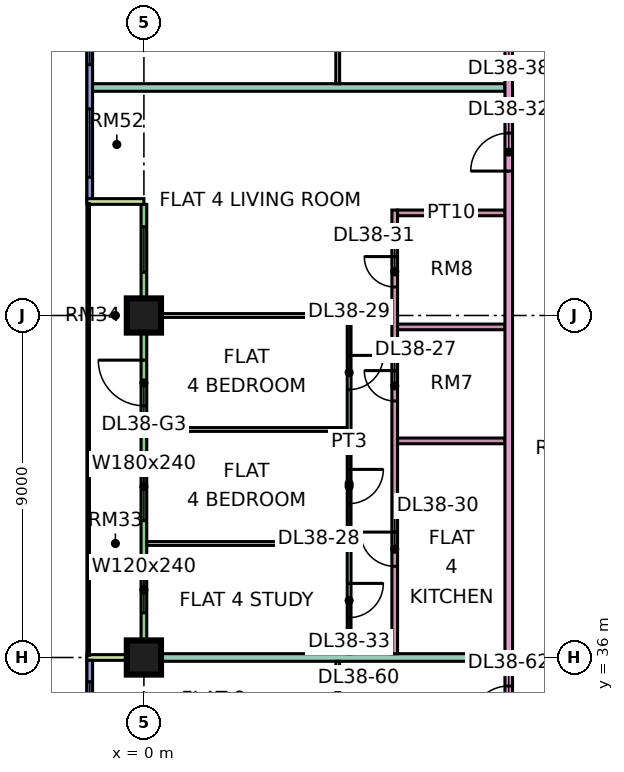
"""IFC4 building model, lengths in metres.
Left out: names, types, materials, properties, quantities, classifications, styles, units other than length and angle.
Written with IfcOpenShell. Run it as: python <this file> out.ifc"""

import sys

from ifc_helpers import new_model, si_unit, direction, frame, frame_2d, origin, origin_2d, place, context, subcontext, project, spatial, rectangle, extrude, element, fill, save


model = new_model("IFC4")
c1 = context("Model", 3, precision=1e-05, world=origin(), true_north=direction((0.0, 1.0)))
c2 = subcontext(c1, "Body", "Model", "MODEL_VIEW")
j1 = project(units=[si_unit("LENGTHUNIT", "METRE"), si_unit("PLANEANGLEUNIT", "RADIAN")], contexts=[c1])
p1 = place(None, origin())
s1 = spatial("IfcSite", under=j1, at=p1, CompositionType="ELEMENT")
p2 = place(p1, origin())
s2 = spatial("IfcBuilding", under=s1, at=p2, CompositionType="ELEMENT")
p3 = place(p2, frame((0.0, 0.0, 168.65)))
s3 = spatial("IfcBuildingStorey", under=s2, at=p3, CompositionType="ELEMENT", Elevation=168.65)
p4 = place(p3, frame((0.0, 36.0, 0.0), z_axis=(0.0, 0.0, 1.0), x_axis=(1.0, 0.0, 0.0)))
e1 = element("IfcColumn", 1, at=p4, inside=s3, PredefinedType="COLUMN", context=c2, shape_type="SweptSolid", body=[
    extrude(rectangle(XDim=0.9, YDim=0.9, at=origin_2d()), origin(), (0.0, 0.0, 1.0), 3.75),
])
p5 = place(p3, frame((0.0, 45.0, 0.0), z_axis=(0.0, 0.0, 1.0), x_axis=(1.0, 0.0, 0.0)))
e2 = element("IfcColumn", 2, at=p5, inside=s3, PredefinedType="COLUMN", context=c2, shape_type="SweptSolid", body=[
    extrude(rectangle(XDim=0.9, YDim=0.9, at=origin_2d()), origin(), (0.0, 0.0, 1.0), 3.75),
])
p6 = place(p3, frame((-1.425, 61.5, 0.0), z_axis=(0.0, 0.0, 1.0), x_axis=(0.0, -1.0, 0.0)))
e3 = element("IfcWall", 3, at=p6, inside=s3, PredefinedType="SOLIDWALL", context=c2, shape_type="SweptSolid", body=[
    extrude(rectangle(XDim=13.425, YDim=0.15, at=frame_2d((6.712, 0.0))), origin(), (0.0, 0.0, 1.0), 3.35),
])
p7 = place(p6, frame((0.45, 0.0, 0.45)))
e4 = element("IfcOpeningElement", 4, at=p7, cuts=e3, PredefinedType="OPENING", context=c2, shape_type="SweptSolid", body=[
    extrude(rectangle(XDim=3.6, YDim=2.4, at=frame_2d((1.8, 1.2))), frame((0.0, 0.085, 0.0), z_axis=(0.0, -1.0, 0.0), x_axis=(1.0, 0.0, 0.0)), (0.0, 0.0, 1.0), 0.17),
])
p8 = place(p6, frame((5.1, 0.0, 0.45)))
e5 = element("IfcOpeningElement", 5, at=p8, cuts=e3, PredefinedType="OPENING", context=c2, shape_type="SweptSolid", body=[
    extrude(rectangle(XDim=1.8, YDim=2.4, at=frame_2d((0.9, 1.2))), frame((0.0, 0.085, 0.0), z_axis=(0.0, -1.0, 0.0), x_axis=(1.0, 0.0, 0.0)), (0.0, 0.0, 1.0), 0.17),
])
p9 = place(p6, frame((8.1, 0.0, 0.45)))
e6 = element("IfcOpeningElement", 6, at=p9, cuts=e3, PredefinedType="OPENING", context=c2, shape_type="SweptSolid", body=[
    extrude(rectangle(XDim=1.8, YDim=2.4, at=frame_2d((0.9, 1.2))), frame((0.0, 0.085, 0.0), z_axis=(0.0, -1.0, 0.0), x_axis=(1.0, 0.0, 0.0)), (0.0, 0.0, 1.0), 0.17),
])
p10 = place(p6, frame((11.062, 0.0, 0.45)))
e7 = element("IfcOpeningElement", 7, at=p10, cuts=e3, PredefinedType="OPENING", context=c2, shape_type="SweptSolid", body=[
    extrude(rectangle(XDim=1.8, YDim=2.4, at=frame_2d((0.9, 1.2))), frame((0.0, 0.085, 0.0), z_axis=(0.0, -1.0, 0.0), x_axis=(1.0, 0.0, 0.0)), (0.0, 0.0, 1.0), 0.17),
])
p11 = place(p3, frame((0.0, 47.925, 0.0), z_axis=(0.0, 0.0, 1.0), x_axis=(0.0, -1.0, 0.0)))
e8 = element("IfcWall", 8, at=p11, inside=s3, PredefinedType="SOLIDWALL", context=c2, shape_type="SweptSolid", body=[
    extrude(rectangle(XDim=11.85, YDim=0.15, at=frame_2d((5.925, 0.0))), origin(), (0.0, 0.0, 1.0), 3.35),
])
p12 = place(p11, frame((0.587, 0.0, 0.45)))
e9 = element("IfcOpeningElement", 9, at=p12, cuts=e8, PredefinedType="OPENING", context=c2, shape_type="SweptSolid", body=[
    extrude(rectangle(XDim=1.2, YDim=2.4, at=frame_2d((0.6, 1.2))), frame((0.0, 0.085, 0.0), z_axis=(0.0, -1.0, 0.0), x_axis=(1.0, 0.0, 0.0)), (0.0, 0.0, 1.0), 0.17),
])
p13 = place(p11, frame((4.1, 0.0, 0.0)))
e10 = element("IfcOpeningElement", 10, at=p13, cuts=e8, PredefinedType="OPENING", context=c2, shape_type="SweptSolid", body=[
    extrude(rectangle(XDim=1.2, YDim=2.4, at=frame_2d((0.6, 1.2))), frame((0.0, 0.085, 0.0), z_axis=(0.0, -1.0, 0.0), x_axis=(1.0, 0.0, 0.0)), (0.0, 0.0, 1.0), 0.17),
])
p14 = place(p11, frame((6.525, 0.0, 0.45)))
e11 = element("IfcOpeningElement", 11, at=p14, cuts=e8, PredefinedType="OPENING", context=c2, shape_type="SweptSolid", body=[
    extrude(rectangle(XDim=1.8, YDim=2.4, at=frame_2d((0.9, 1.2))), frame((0.0, 0.085, 0.0), z_axis=(0.0, -1.0, 0.0), x_axis=(1.0, 0.0, 0.0)), (0.0, 0.0, 1.0), 0.17),
])
p15 = place(p11, frame((9.55, 0.0, 0.45)))
e12 = element("IfcOpeningElement", 12, at=p15, cuts=e8, PredefinedType="OPENING", context=c2, shape_type="SweptSolid", body=[
    extrude(rectangle(XDim=1.2, YDim=2.4, at=frame_2d((0.6, 1.2))), frame((0.0, 0.085, 0.0), z_axis=(0.0, -1.0, 0.0), x_axis=(1.0, 0.0, 0.0)), (0.0, 0.0, 1.0), 0.17),
])
for number, where, z_axis, x_axis in (
    (13, (-1.5, 48.0, 0.0), (0.0, 0.0, 1.0), (1.0, 0.0, 0.0)),
    (14, (-1.5, 36.0, 0.0), (0.0, 0.0, 1.0), (1.0, 0.0, 0.0)),
):
    element("IfcWall", number, at=place(p3, frame(where, z_axis=z_axis, x_axis=x_axis)), inside=s3, PredefinedType="SOLIDWALL", context=c2, shape_type="SweptSolid", body=[
        extrude(rectangle(XDim=1.5, YDim=0.15, at=frame_2d((0.75, 0.0))), origin(), (0.0, 0.0, 1.0), 3.35),
    ])
p16 = place(p3, frame((-1.425, 35.925, 0.0), z_axis=(0.0, 0.0, 1.0), x_axis=(0.0, -1.0, 0.0)))
e15 = element("IfcWall", 15, at=p16, inside=s3, PredefinedType="SOLIDWALL", context=c2, shape_type="SweptSolid", body=[
    extrude(rectangle(XDim=11.85, YDim=0.15, at=frame_2d((5.925, 0.0))), origin(), (0.0, 0.0, 1.0), 3.35),
])
p17 = place(p16, frame((0.562, 0.0, 0.45)))
e16 = element("IfcOpeningElement", 16, at=p17, cuts=e15, PredefinedType="OPENING", context=c2, shape_type="SweptSolid", body=[
    extrude(rectangle(XDim=1.8, YDim=2.4, at=frame_2d((0.9, 1.2))), frame((0.0, 0.085, 0.0), z_axis=(0.0, -1.0, 0.0), x_axis=(1.0, 0.0, 0.0)), (0.0, 0.0, 1.0), 0.17),
])
p18 = place(p16, frame((3.525, 0.0, 0.45)))
e17 = element("IfcOpeningElement", 17, at=p18, cuts=e15, PredefinedType="OPENING", context=c2, shape_type="SweptSolid", body=[
    extrude(rectangle(XDim=1.8, YDim=2.4, at=frame_2d((0.9, 1.2))), frame((0.0, 0.085, 0.0), z_axis=(0.0, -1.0, 0.0), x_axis=(1.0, 0.0, 0.0)), (0.0, 0.0, 1.0), 0.17),
])
p19 = place(p16, frame((7.387, 0.0, 0.45)))
e18 = element("IfcOpeningElement", 18, at=p19, cuts=e15, PredefinedType="OPENING", context=c2, shape_type="SweptSolid", body=[
    extrude(rectangle(XDim=3.0, YDim=2.4, at=frame_2d((1.5, 1.2))), frame((0.0, 0.085, 0.0), z_axis=(0.0, -1.0, 0.0), x_axis=(1.0, 0.0, 0.0)), (0.0, 0.0, 1.0), 0.17),
])
e19 = element("IfcWall", 19, at=p4, inside=s3, PredefinedType="PARTITIONING", context=c2, shape_type="SweptSolid", body=[
    extrude(rectangle(XDim=9.5, YDim=0.2, at=frame_2d((4.75, 0.0))), origin(), (0.0, 0.0, 1.0), 3.35),
])
p20 = place(p3, frame((-1.35, 51.0, 0.0), z_axis=(0.0, 0.0, 1.0), x_axis=(1.0, 0.0, 0.0)))
e20 = element("IfcWall", 20, at=p20, inside=s3, PredefinedType="PARTITIONING", context=c2, shape_type="SweptSolid", body=[
    extrude(rectangle(XDim=10.85, YDim=0.2, at=frame_2d((5.425, 0.0))), origin(), (0.0, 0.0, 1.0), 3.35),
])
for number, where, z_axis, x_axis in (
    (21, (0.074, 39.0, 0.0), (0.0, 0.0, 1.0), (1.0, 0.0, 0.0)),
    (22, (0.074, 42.0, 0.0), (0.0, 0.0, 1.0), (1.0, 0.0, 0.0)),
    (23, (0.074, 45.0, 0.0), (0.0, 0.0, 1.0), (1.0, 0.0, 0.0)),
):
    element("IfcWall", number, at=place(p3, frame(where, z_axis=z_axis, x_axis=x_axis)), inside=s3, PredefinedType="PARTITIONING", context=c2, shape_type="SweptSolid", body=[
        extrude(rectangle(XDim=5.276, YDim=0.1, at=frame_2d((2.638, 0.0))), origin(), (0.0, 0.0, 1.0), 3.35),
    ])
p21 = place(p3, frame((5.1, 29.95, 0.0), z_axis=(0.0, 0.0, 1.0), x_axis=(0.0, 1.0, 0.0)))
e24 = element("IfcWall", 24, at=p21, inside=s3, PredefinedType="PARTITIONING", context=c2, shape_type="SweptSolid", body=[
    extrude(rectangle(XDim=5.95, YDim=0.1, at=frame_2d((2.975, 0.0))), origin(), (0.0, 0.0, 1.0), 3.35),
])
p22 = place(p21, frame((1.1, 0.0, 0.0)))
e25 = element("IfcOpeningElement", 25, at=p22, cuts=e24, PredefinedType="OPENING", context=c2, shape_type="SweptSolid", body=[
    extrude(rectangle(XDim=0.9, YDim=2.1, at=frame_2d((0.45, 1.05))), frame((0.0, 0.06, 0.0), z_axis=(0.0, -1.0, 0.0), x_axis=(1.0, 0.0, 0.0)), (0.0, 0.0, 1.0), 0.12),
])
p23 = place(p21, frame((4.1, 0.0, 0.0)))
e26 = element("IfcOpeningElement", 26, at=p23, cuts=e24, PredefinedType="OPENING", context=c2, shape_type="SweptSolid", body=[
    extrude(rectangle(XDim=0.9, YDim=2.1, at=frame_2d((0.45, 1.05))), frame((0.0, 0.06, 0.0), z_axis=(0.0, -1.0, 0.0), x_axis=(1.0, 0.0, 0.0)), (0.0, 0.0, 1.0), 0.12),
])
p24 = place(p3, frame((5.1, 51.1, 0.0), z_axis=(0.0, 0.0, 1.0), x_axis=(0.0, 1.0, 0.0)))
e27 = element("IfcWall", 27, at=p24, inside=s3, PredefinedType="PARTITIONING", context=c2, shape_type="SweptSolid", body=[
    extrude(rectangle(XDim=5.95, YDim=0.1, at=frame_2d((2.975, 0.0))), origin(), (0.0, 0.0, 1.0), 3.35),
])
p25 = place(p24, frame((0.95, 0.0, 0.0)))
e28 = element("IfcOpeningElement", 28, at=p25, cuts=e27, PredefinedType="OPENING", context=c2, shape_type="SweptSolid", body=[
    extrude(rectangle(XDim=0.9, YDim=2.1, at=frame_2d((0.45, 1.05))), frame((0.0, 0.06, 0.0), z_axis=(0.0, -1.0, 0.0), x_axis=(1.0, 0.0, 0.0)), (0.0, 0.0, 1.0), 0.12),
])
p26 = place(p24, frame((3.95, 0.0, 0.0)))
e29 = element("IfcOpeningElement", 29, at=p26, cuts=e27, PredefinedType="OPENING", context=c2, shape_type="SweptSolid", body=[
    extrude(rectangle(XDim=0.9, YDim=2.1, at=frame_2d((0.45, 1.05))), frame((0.0, 0.06, 0.0), z_axis=(0.0, -1.0, 0.0), x_axis=(1.0, 0.0, 0.0)), (0.0, 0.0, 1.0), 0.12),
])
p27 = place(p3, frame((5.4, 36.1, 0.0), z_axis=(0.0, 0.0, 1.0), x_axis=(0.0, 1.0, 0.0)))
e30 = element("IfcWall", 30, at=p27, inside=s3, PredefinedType="PARTITIONING", context=c2, shape_type="SweptSolid", body=[
    extrude(rectangle(XDim=8.95, YDim=0.1, at=frame_2d((4.475, 0.0))), origin(), (0.0, 0.0, 1.0), 3.35),
])
p28 = place(p27, frame((3.95, 0.0, 0.0)))
e31 = element("IfcOpeningElement", 31, at=p28, cuts=e30, PredefinedType="OPENING", context=c2, shape_type="SweptSolid", body=[
    extrude(rectangle(XDim=0.9, YDim=2.1, at=frame_2d((0.45, 1.05))), frame((0.0, 0.06, 0.0), z_axis=(0.0, -1.0, 0.0), x_axis=(1.0, 0.0, 0.0)), (0.0, 0.0, 1.0), 0.12),
])
p29 = place(p27, frame((6.95, 0.0, 0.0)))
e32 = element("IfcOpeningElement", 32, at=p29, cuts=e30, PredefinedType="OPENING", context=c2, shape_type="SweptSolid", body=[
    extrude(rectangle(XDim=0.9, YDim=2.1, at=frame_2d((0.45, 1.05))), frame((0.0, 0.06, 0.0), z_axis=(0.0, -1.0, 0.0), x_axis=(1.0, 0.0, 0.0)), (0.0, 0.0, 1.0), 0.12),
])
p30 = place(p27, frame((0.95, 0.0, 0.0)))
e33 = element("IfcOpeningElement", 33, at=p30, cuts=e30, PredefinedType="OPENING", context=c2, shape_type="SweptSolid", body=[
    extrude(rectangle(XDim=0.9, YDim=2.1, at=frame_2d((0.45, 1.05))), frame((0.0, 0.06, 0.0), z_axis=(0.0, -1.0, 0.0), x_axis=(1.0, 0.0, 0.0)), (0.0, 0.0, 1.0), 0.12),
])
p31 = place(p3, frame((6.6, 36.1, 0.0), z_axis=(0.0, 0.0, 1.0), x_axis=(0.0, 1.0, 0.0)))
e34 = element("IfcWall", 34, at=p31, inside=s3, PredefinedType="PARTITIONING", context=c2, shape_type="SweptSolid", body=[
    extrude(rectangle(XDim=11.675, YDim=0.15, at=frame_2d((5.837, 0.0))), origin(), (0.0, 0.0, 1.0), 3.35),
])
p32 = place(p31, frame((6.65, 0.0, 0.0)))
e35 = element("IfcOpeningElement", 35, at=p32, cuts=e34, PredefinedType="OPENING", context=c2, shape_type="SweptSolid", body=[
    extrude(rectangle(XDim=0.8, YDim=2.1, at=frame_2d((0.4, 1.05))), frame((0.0, 0.085, 0.0), z_axis=(0.0, -1.0, 0.0), x_axis=(1.0, 0.0, 0.0)), (0.0, 0.0, 1.0), 0.17),
])
p33 = place(p31, frame((2.3, 0.0, 0.0)))
e36 = element("IfcOpeningElement", 36, at=p33, cuts=e34, PredefinedType="OPENING", context=c2, shape_type="SweptSolid", body=[
    extrude(rectangle(XDim=0.9, YDim=2.1, at=frame_2d((0.45, 1.05))), frame((0.0, 0.085, 0.0), z_axis=(0.0, -1.0, 0.0), x_axis=(1.0, 0.0, 0.0)), (0.0, 0.0, 1.0), 0.17),
])
p34 = place(p31, frame((9.65, 0.0, 0.0)))
e37 = element("IfcOpeningElement", 37, at=p34, cuts=e34, PredefinedType="OPENING", context=c2, shape_type="SweptSolid", body=[
    extrude(rectangle(XDim=0.8, YDim=2.1, at=frame_2d((0.4, 1.05))), frame((0.0, 0.085, 0.0), z_axis=(0.0, -1.0, 0.0), x_axis=(1.0, 0.0, 0.0)), (0.0, 0.0, 1.0), 0.17),
])
for number, where, z_axis, x_axis in (
    (38, (6.675, 41.7, 0.0), (0.0, 0.0, 1.0), (1.0, 0.0, 0.0)),
    (39, (6.675, 44.7, 0.0), (0.0, 0.0, 1.0), (1.0, 0.0, 0.0)),
    (40, (6.675, 47.7, 0.0), (0.0, 0.0, 1.0), (1.0, 0.0, 0.0)),
):
    element("IfcWall", number, at=place(p3, frame(where, z_axis=z_axis, x_axis=x_axis)), inside=s3, PredefinedType="PARTITIONING", context=c2, shape_type="SweptSolid", body=[
        extrude(rectangle(XDim=2.825, YDim=0.15, at=frame_2d((1.413, 0.0))), origin(), (0.0, 0.0, 1.0), 3.35),
    ])
p35 = place(p3, frame((9.6, 20.0, 0.0), z_axis=(0.0, 0.0, 1.0), x_axis=(0.0, 1.0, 0.0)))
e41 = element("IfcWall", 41, at=p35, inside=s3, PredefinedType="PARTITIONING", context=c2, shape_type="SweptSolid", body=[
    extrude(rectangle(XDim=44.35, YDim=0.2, at=frame_2d((22.175, 0.0))), origin(), (0.0, 0.0, 1.0), 3.35),
])
p36 = place(p35, frame((28.8, 0.0, 0.0)))
e42 = element("IfcOpeningElement", 42, at=p36, cuts=e41, PredefinedType="OPENING", context=c2, shape_type="SweptSolid", body=[
    extrude(rectangle(XDim=1.0, YDim=2.1, at=frame_2d((0.5, 1.05))), frame((0.0, 0.11, 0.0), z_axis=(0.0, -1.0, 0.0), x_axis=(1.0, 0.0, 0.0)), (0.0, 0.0, 1.0), 0.22),
])
p37 = place(p35, frame((32.1, 0.0, 0.0)))
e43 = element("IfcOpeningElement", 43, at=p37, cuts=e41, PredefinedType="OPENING", context=c2, shape_type="SweptSolid", body=[
    extrude(rectangle(XDim=1.0, YDim=2.1, at=frame_2d((0.5, 1.05))), frame((0.0, 0.11, 0.0), z_axis=(0.0, -1.0, 0.0), x_axis=(1.0, 0.0, 0.0)), (0.0, 0.0, 1.0), 0.22),
])
p38 = place(p35, frame((0.6, 0.0, 0.0)))
e44 = element("IfcOpeningElement", 44, at=p38, cuts=e41, PredefinedType="OPENING", context=c2, shape_type="SweptSolid", body=[
    extrude(rectangle(XDim=1.2, YDim=2.1, at=frame_2d((0.6, 1.05))), frame((0.0, 0.11, 0.0), z_axis=(0.0, -1.0, 0.0), x_axis=(1.0, 0.0, 0.0)), (0.0, 0.0, 1.0), 0.22),
])
p39 = place(p35, frame((14.25, 0.0, 0.0)))
e45 = element("IfcOpeningElement", 45, at=p39, cuts=e41, PredefinedType="OPENING", context=c2, shape_type="SweptSolid", body=[
    extrude(rectangle(XDim=1.0, YDim=2.1, at=frame_2d((0.5, 1.05))), frame((0.0, 0.11, 0.0), z_axis=(0.0, -1.0, 0.0), x_axis=(1.0, 0.0, 0.0)), (0.0, 0.0, 1.0), 0.22),
])
p40 = place(p9, origin())
e46 = element("IfcWindow", 46, at=p40, inside=s3, PartitioningType="SINGLE_PANEL", PredefinedType="WINDOW", context=c2, shape_type="SweptSolid", body=[
    extrude(rectangle(XDim=1.8, YDim=2.4, at=frame_2d((0.9, 1.2))), frame((0.0, 0.03, 0.0), z_axis=(0.0, -1.0, 0.0), x_axis=(1.0, 0.0, 0.0)), (0.0, 0.0, 1.0), 0.06),
])
fill(e6, e46)
p41 = place(p10, origin())
e47 = element("IfcWindow", 47, at=p41, inside=s3, PartitioningType="SINGLE_PANEL", PredefinedType="WINDOW", context=c2, shape_type="SweptSolid", body=[
    extrude(rectangle(XDim=1.8, YDim=2.4, at=frame_2d((0.9, 1.2))), frame((0.0, 0.03, 0.0), z_axis=(0.0, -1.0, 0.0), x_axis=(1.0, 0.0, 0.0)), (0.0, 0.0, 1.0), 0.06),
])
fill(e7, e47)
p42 = place(p12, origin())
e48 = element("IfcWindow", 48, at=p42, inside=s3, PartitioningType="SINGLE_PANEL", PredefinedType="WINDOW", context=c2, shape_type="SweptSolid", body=[
    extrude(rectangle(XDim=1.2, YDim=2.4, at=frame_2d((0.6, 1.2))), frame((0.0, 0.03, 0.0), z_axis=(0.0, -1.0, 0.0), x_axis=(1.0, 0.0, 0.0)), (0.0, 0.0, 1.0), 0.06),
])
fill(e9, e48)
p43 = place(p13, frame((1.2, 0.0, 0.0), z_axis=(0.0, 0.0, 1.0), x_axis=(-1.0, 0.0, 0.0)))
e49 = element("IfcDoor", 49, at=p43, inside=s3, OperationType="DOUBLE_DOOR_SINGLE_SWING", PredefinedType="DOOR", context=c2, shape_type="SweptSolid", body=[
    extrude(rectangle(XDim=1.2, YDim=2.4, at=frame_2d((0.6, 1.2))), frame((0.0, 0.025, 0.0), z_axis=(0.0, -1.0, 0.0), x_axis=(1.0, 0.0, 0.0)), (0.0, 0.0, 1.0), 0.05),
])
fill(e10, e49)
p44 = place(p14, origin())
e50 = element("IfcWindow", 50, at=p44, inside=s3, PartitioningType="SINGLE_PANEL", PredefinedType="WINDOW", context=c2, shape_type="SweptSolid", body=[
    extrude(rectangle(XDim=1.8, YDim=2.4, at=frame_2d((0.9, 1.2))), frame((0.0, 0.03, 0.0), z_axis=(0.0, -1.0, 0.0), x_axis=(1.0, 0.0, 0.0)), (0.0, 0.0, 1.0), 0.06),
])
fill(e11, e50)
p45 = place(p15, origin())
e51 = element("IfcWindow", 51, at=p45, inside=s3, PartitioningType="SINGLE_PANEL", PredefinedType="WINDOW", context=c2, shape_type="SweptSolid", body=[
    extrude(rectangle(XDim=1.2, YDim=2.4, at=frame_2d((0.6, 1.2))), frame((0.0, 0.03, 0.0), z_axis=(0.0, -1.0, 0.0), x_axis=(1.0, 0.0, 0.0)), (0.0, 0.0, 1.0), 0.06),
])
fill(e12, e51)
p46 = place(p17, origin())
e52 = element("IfcWindow", 52, at=p46, inside=s3, PartitioningType="SINGLE_PANEL", PredefinedType="WINDOW", context=c2, shape_type="SweptSolid", body=[
    extrude(rectangle(XDim=1.8, YDim=2.4, at=frame_2d((0.9, 1.2))), frame((0.0, 0.03, 0.0), z_axis=(0.0, -1.0, 0.0), x_axis=(1.0, 0.0, 0.0)), (0.0, 0.0, 1.0), 0.06),
])
fill(e16, e52)
p47 = place(p32, frame((0.8, 0.0, 0.0), z_axis=(0.0, 0.0, 1.0), x_axis=(-1.0, 0.0, 0.0)))
e53 = element("IfcDoor", 53, at=p47, inside=s3, OperationType="SINGLE_SWING_RIGHT", PredefinedType="DOOR", context=c2, shape_type="SweptSolid", body=[
    extrude(rectangle(XDim=0.8, YDim=2.1, at=frame_2d((0.4, 1.05))), frame((0.0, 0.025, 0.0), z_axis=(0.0, -1.0, 0.0), x_axis=(1.0, 0.0, 0.0)), (0.0, 0.0, 1.0), 0.05),
])
fill(e35, e53)
p48 = place(p28, origin())
e54 = element("IfcDoor", 54, at=p48, inside=s3, OperationType="SINGLE_SWING_RIGHT", PredefinedType="DOOR", context=c2, shape_type="SweptSolid", body=[
    extrude(rectangle(XDim=0.9, YDim=2.1, at=frame_2d((0.45, 1.05))), frame((0.0, 0.025, 0.0), z_axis=(0.0, -1.0, 0.0), x_axis=(1.0, 0.0, 0.0)), (0.0, 0.0, 1.0), 0.05),
])
fill(e31, e54)
p49 = place(p29, origin())
e55 = element("IfcDoor", 55, at=p49, inside=s3, OperationType="SINGLE_SWING_RIGHT", PredefinedType="DOOR", context=c2, shape_type="SweptSolid", body=[
    extrude(rectangle(XDim=0.9, YDim=2.1, at=frame_2d((0.45, 1.05))), frame((0.0, 0.025, 0.0), z_axis=(0.0, -1.0, 0.0), x_axis=(1.0, 0.0, 0.0)), (0.0, 0.0, 1.0), 0.05),
])
fill(e32, e55)
p50 = place(p33, frame((0.9, 0.0, 0.0), z_axis=(0.0, 0.0, 1.0), x_axis=(-1.0, 0.0, 0.0)))
e56 = element("IfcDoor", 56, at=p50, inside=s3, OperationType="SINGLE_SWING_RIGHT", PredefinedType="DOOR", context=c2, shape_type="SweptSolid", body=[
    extrude(rectangle(XDim=0.9, YDim=2.1, at=frame_2d((0.45, 1.05))), frame((0.0, 0.025, 0.0), z_axis=(0.0, -1.0, 0.0), x_axis=(1.0, 0.0, 0.0)), (0.0, 0.0, 1.0), 0.05),
])
fill(e36, e56)
p51 = place(p34, frame((0.8, 0.0, 0.0), z_axis=(0.0, 0.0, 1.0), x_axis=(-1.0, 0.0, 0.0)))
e57 = element("IfcDoor", 57, at=p51, inside=s3, OperationType="SINGLE_SWING_RIGHT", PredefinedType="DOOR", context=c2, shape_type="SweptSolid", body=[
    extrude(rectangle(XDim=0.8, YDim=2.1, at=frame_2d((0.4, 1.05))), frame((0.0, 0.025, 0.0), z_axis=(0.0, -1.0, 0.0), x_axis=(1.0, 0.0, 0.0)), (0.0, 0.0, 1.0), 0.05),
])
fill(e37, e57)
p52 = place(p36, origin())
e58 = element("IfcDoor", 58, at=p52, inside=s3, OperationType="SINGLE_SWING_LEFT", PredefinedType="DOOR", context=c2, shape_type="SweptSolid", body=[
    extrude(rectangle(XDim=1.0, YDim=2.1, at=frame_2d((0.5, 1.05))), frame((0.0, 0.025, 0.0), z_axis=(0.0, -1.0, 0.0), x_axis=(1.0, 0.0, 0.0)), (0.0, 0.0, 1.0), 0.05),
])
fill(e42, e58)
p53 = place(p30, origin())
e59 = element("IfcDoor", 59, at=p53, inside=s3, OperationType="SINGLE_SWING_RIGHT", PredefinedType="DOOR", context=c2, shape_type="SweptSolid", body=[
    extrude(rectangle(XDim=0.9, YDim=2.1, at=frame_2d((0.45, 1.05))), frame((0.0, 0.025, 0.0), z_axis=(0.0, -1.0, 0.0), x_axis=(1.0, 0.0, 0.0)), (0.0, 0.0, 1.0), 0.05),
])
fill(e33, e59)
p54 = place(p39, origin())
e60 = element("IfcDoor", 60, at=p54, inside=s3, OperationType="SINGLE_SWING_LEFT", PredefinedType="DOOR", context=c2, shape_type="SweptSolid", body=[
    extrude(rectangle(XDim=1.0, YDim=2.1, at=frame_2d((0.5, 1.05))), frame((0.0, 0.025, 0.0), z_axis=(0.0, -1.0, 0.0), x_axis=(1.0, 0.0, 0.0)), (0.0, 0.0, 1.0), 0.05),
])
fill(e45, e60)
save(model, sys.argv[1])
